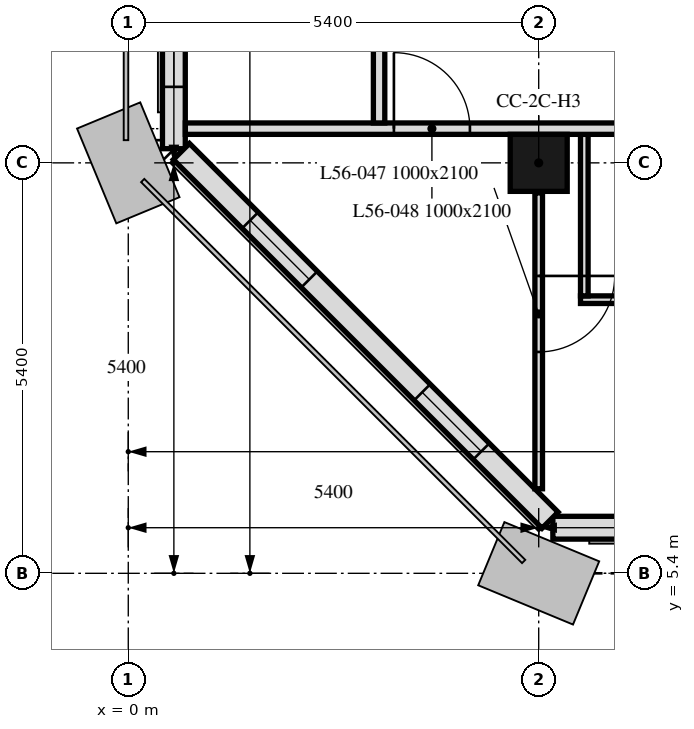
"""IFC4 building model, lengths in metres.
Left out: names, types, materials, properties, quantities, classifications, styles, units other than length and angle.
Written with IfcOpenShell. Run it as: python <this file> out.ifc"""

import sys

from ifc_helpers import new_model, si_unit, direction, frame, frame_2d, origin, origin_2d, place, context, subcontext, project, spatial, rectangle, extrude, element, fill, save


model = new_model("IFC4")
c1 = context("Model", 3, precision=1e-05, world=origin(), true_north=direction((0.0, 1.0)))
c2 = subcontext(c1, "Body", "Model", "MODEL_VIEW")
j1 = project(units=[si_unit("LENGTHUNIT", "METRE"), si_unit("PLANEANGLEUNIT", "RADIAN")], contexts=[c1])
p1 = place(None, origin())
s1 = spatial("IfcSite", under=j1, at=p1, CompositionType="ELEMENT")
p2 = place(p1, origin())
s2 = spatial("IfcBuilding", under=s1, at=p2, CompositionType="ELEMENT")
p3 = place(p2, frame((0.0, 0.0, 223.6)))
s3 = spatial("IfcBuildingStorey", under=s2, at=p3, CompositionType="ELEMENT", Elevation=223.6)
p4 = place(p3, frame((5.4, 10.8, 0.0), z_axis=(0.0, 0.0, 1.0), x_axis=(1.0, 0.0, 0.0)))
e1 = element("IfcColumn", 1, at=p4, inside=s3, PredefinedType="COLUMN", context=c2, shape_type="SweptSolid", body=[
    extrude(rectangle(XDim=0.75, YDim=0.75, at=origin_2d()), origin(), (0.0, 0.0, 1.0), 3.0),
])
p5 = place(p3, frame((5.586, 6.0, 0.0), z_axis=(0.0, 0.0, 1.0), x_axis=(1.0, 0.0, 0.0)))
e2 = element("IfcWall", 2, at=p5, inside=s3, PredefinedType="SOLIDWALL", context=c2, shape_type="SweptSolid", body=[
    extrude(rectangle(XDim=32.027, YDim=0.3, at=frame_2d((16.014, 0.0))), origin(), (0.0, 0.0, 1.0), 3.0),
])
p6 = place(p5, frame((2.764, 0.0, 0.9)))
e3 = element("IfcOpeningElement", 3, at=p6, cuts=e2, PredefinedType="OPENING", context=c2, shape_type="SweptSolid", body=[
    extrude(rectangle(XDim=1.1, YDim=1.7, at=frame_2d((0.55, 0.85))), frame((0.0, 0.16, 0.0), z_axis=(0.0, -1.0, 0.0), x_axis=(1.0, 0.0, 0.0)), (0.0, 0.0, 1.0), 0.32),
])
p7 = place(p5, frame((6.214, 0.0, 0.9)))
e4 = element("IfcOpeningElement", 4, at=p7, cuts=e2, PredefinedType="OPENING", context=c2, shape_type="SweptSolid", body=[
    extrude(rectangle(XDim=3.4, YDim=1.7, at=frame_2d((1.7, 0.85))), frame((0.0, 0.16, 0.0), z_axis=(0.0, -1.0, 0.0), x_axis=(1.0, 0.0, 0.0)), (0.0, 0.0, 1.0), 0.32),
])
p8 = place(p5, frame((13.564, 0.0, 0.9)))
e5 = element("IfcOpeningElement", 5, at=p8, cuts=e2, PredefinedType="OPENING", context=c2, shape_type="SweptSolid", body=[
    extrude(rectangle(XDim=1.1, YDim=1.7, at=frame_2d((0.55, 0.85))), frame((0.0, 0.16, 0.0), z_axis=(0.0, -1.0, 0.0), x_axis=(1.0, 0.0, 0.0)), (0.0, 0.0, 1.0), 0.32),
])
p9 = place(p5, frame((17.014, 0.0, 0.9)))
e6 = element("IfcOpeningElement", 6, at=p9, cuts=e2, PredefinedType="OPENING", context=c2, shape_type="SweptSolid", body=[
    extrude(rectangle(XDim=3.4, YDim=1.7, at=frame_2d((1.7, 0.85))), frame((0.0, 0.16, 0.0), z_axis=(0.0, -1.0, 0.0), x_axis=(1.0, 0.0, 0.0)), (0.0, 0.0, 1.0), 0.32),
])
p10 = place(p5, frame((24.364, 0.0, 0.9)))
e7 = element("IfcOpeningElement", 7, at=p10, cuts=e2, PredefinedType="OPENING", context=c2, shape_type="SweptSolid", body=[
    extrude(rectangle(XDim=1.1, YDim=1.7, at=frame_2d((0.55, 0.85))), frame((0.0, 0.16, 0.0), z_axis=(0.0, -1.0, 0.0), x_axis=(1.0, 0.0, 0.0)), (0.0, 0.0, 1.0), 0.32),
])
p11 = place(p5, frame((27.814, 0.0, 0.9)))
e8 = element("IfcOpeningElement", 8, at=p11, cuts=e2, PredefinedType="OPENING", context=c2, shape_type="SweptSolid", body=[
    extrude(rectangle(XDim=3.4, YDim=1.7, at=frame_2d((1.7, 0.85))), frame((0.0, 0.16, 0.0), z_axis=(0.0, -1.0, 0.0), x_axis=(1.0, 0.0, 0.0)), (0.0, 0.0, 1.0), 0.32),
])
p12 = place(p3, frame((0.6, 43.014, 0.0), z_axis=(0.0, 0.0, 1.0), x_axis=(0.0, -1.0, 0.0)))
e9 = element("IfcWall", 9, at=p12, inside=s3, PredefinedType="SOLIDWALL", context=c2, shape_type="SweptSolid", body=[
    extrude(rectangle(XDim=32.027, YDim=0.3, at=frame_2d((16.014, 0.0))), origin(), (0.0, 0.0, 1.0), 3.0),
])
p13 = place(p12, frame((1.789, 0.0, 0.9)))
e10 = element("IfcOpeningElement", 10, at=p13, cuts=e9, PredefinedType="OPENING", context=c2, shape_type="SweptSolid", body=[
    extrude(rectangle(XDim=0.65, YDim=1.7, at=frame_2d((0.325, 0.85))), frame((0.0, 0.16, 0.0), z_axis=(0.0, -1.0, 0.0), x_axis=(1.0, 0.0, 0.0)), (0.0, 0.0, 1.0), 0.32),
])
p14 = place(p12, frame((2.764, 0.0, 0.9)))
e11 = element("IfcOpeningElement", 11, at=p14, cuts=e9, PredefinedType="OPENING", context=c2, shape_type="SweptSolid", body=[
    extrude(rectangle(XDim=1.1, YDim=1.7, at=frame_2d((0.55, 0.85))), frame((0.0, 0.16, 0.0), z_axis=(0.0, -1.0, 0.0), x_axis=(1.0, 0.0, 0.0)), (0.0, 0.0, 1.0), 0.32),
])
p15 = place(p12, frame((6.214, 0.0, 0.9)))
e12 = element("IfcOpeningElement", 12, at=p15, cuts=e9, PredefinedType="OPENING", context=c2, shape_type="SweptSolid", body=[
    extrude(rectangle(XDim=3.4, YDim=1.7, at=frame_2d((1.7, 0.85))), frame((0.0, 0.16, 0.0), z_axis=(0.0, -1.0, 0.0), x_axis=(1.0, 0.0, 0.0)), (0.0, 0.0, 1.0), 0.32),
])
p16 = place(p12, frame((11.964, 0.0, 0.9)))
e13 = element("IfcOpeningElement", 13, at=p16, cuts=e9, PredefinedType="OPENING", context=c2, shape_type="SweptSolid", body=[
    extrude(rectangle(XDim=1.1, YDim=1.7, at=frame_2d((0.55, 0.85))), frame((0.0, 0.16, 0.0), z_axis=(0.0, -1.0, 0.0), x_axis=(1.0, 0.0, 0.0)), (0.0, 0.0, 1.0), 0.32),
])
p17 = place(p12, frame((13.564, 0.0, 0.9)))
e14 = element("IfcOpeningElement", 14, at=p17, cuts=e9, PredefinedType="OPENING", context=c2, shape_type="SweptSolid", body=[
    extrude(rectangle(XDim=1.1, YDim=1.7, at=frame_2d((0.55, 0.85))), frame((0.0, 0.16, 0.0), z_axis=(0.0, -1.0, 0.0), x_axis=(1.0, 0.0, 0.0)), (0.0, 0.0, 1.0), 0.32),
])
p18 = place(p12, frame((17.364, 0.0, 0.9)))
e15 = element("IfcOpeningElement", 15, at=p18, cuts=e9, PredefinedType="OPENING", context=c2, shape_type="SweptSolid", body=[
    extrude(rectangle(XDim=1.1, YDim=1.7, at=frame_2d((0.55, 0.85))), frame((0.0, 0.16, 0.0), z_axis=(0.0, -1.0, 0.0), x_axis=(1.0, 0.0, 0.0)), (0.0, 0.0, 1.0), 0.32),
])
p19 = place(p12, frame((18.964, 0.0, 0.9)))
e16 = element("IfcOpeningElement", 16, at=p19, cuts=e9, PredefinedType="OPENING", context=c2, shape_type="SweptSolid", body=[
    extrude(rectangle(XDim=1.1, YDim=1.7, at=frame_2d((0.55, 0.85))), frame((0.0, 0.16, 0.0), z_axis=(0.0, -1.0, 0.0), x_axis=(1.0, 0.0, 0.0)), (0.0, 0.0, 1.0), 0.32),
])
p20 = place(p12, frame((22.764, 0.0, 0.9)))
e17 = element("IfcOpeningElement", 17, at=p20, cuts=e9, PredefinedType="OPENING", context=c2, shape_type="SweptSolid", body=[
    extrude(rectangle(XDim=1.1, YDim=1.7, at=frame_2d((0.55, 0.85))), frame((0.0, 0.16, 0.0), z_axis=(0.0, -1.0, 0.0), x_axis=(1.0, 0.0, 0.0)), (0.0, 0.0, 1.0), 0.32),
])
p21 = place(p12, frame((24.364, 0.0, 0.9)))
e18 = element("IfcOpeningElement", 18, at=p21, cuts=e9, PredefinedType="OPENING", context=c2, shape_type="SweptSolid", body=[
    extrude(rectangle(XDim=1.1, YDim=1.7, at=frame_2d((0.55, 0.85))), frame((0.0, 0.16, 0.0), z_axis=(0.0, -1.0, 0.0), x_axis=(1.0, 0.0, 0.0)), (0.0, 0.0, 1.0), 0.32),
])
p22 = place(p12, frame((27.814, 0.0, 0.9)))
e19 = element("IfcOpeningElement", 19, at=p22, cuts=e9, PredefinedType="OPENING", context=c2, shape_type="SweptSolid", body=[
    extrude(rectangle(XDim=3.4, YDim=1.7, at=frame_2d((1.7, 0.85))), frame((0.0, 0.16, 0.0), z_axis=(0.0, -1.0, 0.0), x_axis=(1.0, 0.0, 0.0)), (0.0, 0.0, 1.0), 0.32),
])
p23 = place(p3, frame((0.699, 10.949, 0.0), z_axis=(0.0, 0.0, 1.0), x_axis=(0.707106781187, -0.707106781187, 0.0)))
e20 = element("IfcWall", 20, at=p23, inside=s3, PredefinedType="SOLIDWALL", context=c2, shape_type="SweptSolid", body=[
    extrude(rectangle(XDim=6.86, YDim=0.3, at=frame_2d((3.43, 0.0))), origin(), (0.0, 0.0, 1.0), 3.0),
])
p24 = place(p23, frame((1.28, 0.0, 0.9)))
e21 = element("IfcOpeningElement", 21, at=p24, cuts=e20, PredefinedType="OPENING", context=c2, shape_type="SweptSolid", body=[
    extrude(rectangle(XDim=1.1, YDim=1.7, at=frame_2d((0.55, 0.85))), frame((0.0, 0.16, 0.0), z_axis=(0.0, -1.0, 0.0), x_axis=(1.0, 0.0, 0.0)), (0.0, 0.0, 1.0), 0.32),
])
p25 = place(p23, frame((4.48, 0.0, 0.9)))
e22 = element("IfcOpeningElement", 22, at=p25, cuts=e20, PredefinedType="OPENING", context=c2, shape_type="SweptSolid", body=[
    extrude(rectangle(XDim=1.1, YDim=1.7, at=frame_2d((0.55, 0.85))), frame((0.0, 0.16, 0.0), z_axis=(0.0, -1.0, 0.0), x_axis=(1.0, 0.0, 0.0)), (0.0, 0.0, 1.0), 0.32),
])
p26 = place(p3, frame((8.35, 9.0, 0.0), z_axis=(0.0, 0.0, 1.0), x_axis=(-1.0, 0.0, 0.0)))
e23 = element("IfcWall", 23, at=p26, inside=s3, PredefinedType="PARTITIONING", context=c2, shape_type="SweptSolid", body=[
    extrude(rectangle(XDim=2.4, YDim=0.1, at=frame_2d((1.2, 0.0))), origin(), (0.0, 0.0, 1.0), 3.0),
])
p27 = place(p26, frame((0.25, 0.0, 0.0)))
e24 = element("IfcOpeningElement", 24, at=p27, cuts=e23, PredefinedType="OPENING", context=c2, shape_type="SweptSolid", body=[
    extrude(rectangle(XDim=0.9, YDim=2.1, at=frame_2d((0.45, 1.05))), frame((0.0, 0.05, 0.0), z_axis=(0.0, -1.0, 0.0), x_axis=(1.0, 0.0, 0.0)), (0.0, 0.0, 1.0), 0.1),
])
p28 = place(p3, frame((6.0, 9.05, 0.0), z_axis=(0.0, 0.0, 1.0), x_axis=(0.0, 1.0, 0.0)))
e25 = element("IfcWall", 25, at=p28, inside=s3, PredefinedType="PARTITIONING", context=c2, shape_type="SweptSolid", body=[
    extrude(rectangle(XDim=2.125, YDim=0.1, at=frame_2d((1.062, 0.0))), origin(), (0.0, 0.0, 1.0), 3.0),
])
p29 = place(p3, frame((5.4, 10.405, 0.0), z_axis=(0.0, 0.0, 1.0), x_axis=(0.0, -1.0, 0.0)))
e26 = element("IfcWall", 26, at=p29, inside=s3, PredefinedType="PARTITIONING", context=c2, shape_type="SweptSolid", body=[
    extrude(rectangle(XDim=3.893, YDim=0.1, at=frame_2d((1.946, 0.0))), origin(), (0.0, 0.0, 1.0), 3.0),
])
p30 = place(p29, frame((1.093, 0.0, 0.0)))
e27 = element("IfcOpeningElement", 27, at=p30, cuts=e26, PredefinedType="OPENING", context=c2, shape_type="SweptSolid", body=[
    extrude(rectangle(XDim=1.0, YDim=2.1, at=frame_2d((0.5, 1.05))), frame((0.0, 0.05, 0.0), z_axis=(0.0, -1.0, 0.0), x_axis=(1.0, 0.0, 0.0)), (0.0, 0.0, 1.0), 0.1),
])
p31 = place(p3, frame((0.751, 11.25, 0.0), z_axis=(0.0, 0.0, 1.0), x_axis=(1.0, 0.0, 0.0)))
e28 = element("IfcWall", 28, at=p31, inside=s3, PredefinedType="PARTITIONING", context=c2, shape_type="SweptSolid", body=[
    extrude(rectangle(XDim=41.698, YDim=0.15, at=frame_2d((20.849, 0.0))), origin(), (0.0, 0.0, 1.0), 3.0),
])
p32 = place(p31, frame((39.249, 0.0, 0.0)))
e29 = element("IfcOpeningElement", 29, at=p32, cuts=e28, PredefinedType="OPENING", context=c2, shape_type="SweptSolid", body=[
    extrude(rectangle(XDim=1.0, YDim=2.1, at=frame_2d((0.5, 1.05))), frame((0.0, 0.075, 0.0), z_axis=(0.0, -1.0, 0.0), x_axis=(1.0, 0.0, 0.0)), (0.0, 0.0, 1.0), 0.15),
])
p33 = place(p31, frame((27.649, 0.0, 0.0)))
e30 = element("IfcOpeningElement", 30, at=p33, cuts=e28, PredefinedType="OPENING", context=c2, shape_type="SweptSolid", body=[
    extrude(rectangle(XDim=1.0, YDim=2.1, at=frame_2d((0.5, 1.05))), frame((0.0, 0.075, 0.0), z_axis=(0.0, -1.0, 0.0), x_axis=(1.0, 0.0, 0.0)), (0.0, 0.0, 1.0), 0.15),
])
p34 = place(p31, frame((23.049, 0.0, 0.0)))
e31 = element("IfcOpeningElement", 31, at=p34, cuts=e28, PredefinedType="OPENING", context=c2, shape_type="SweptSolid", body=[
    extrude(rectangle(XDim=1.0, YDim=2.1, at=frame_2d((0.5, 1.05))), frame((0.0, 0.075, 0.0), z_axis=(0.0, -1.0, 0.0), x_axis=(1.0, 0.0, 0.0)), (0.0, 0.0, 1.0), 0.15),
])
p35 = place(p31, frame((11.449, 0.0, 0.0)))
e32 = element("IfcOpeningElement", 32, at=p35, cuts=e28, PredefinedType="OPENING", context=c2, shape_type="SweptSolid", body=[
    extrude(rectangle(XDim=1.0, YDim=2.1, at=frame_2d((0.5, 1.05))), frame((0.0, 0.075, 0.0), z_axis=(0.0, -1.0, 0.0), x_axis=(1.0, 0.0, 0.0)), (0.0, 0.0, 1.0), 0.15),
])
p36 = place(p31, frame((2.744, 0.0, 0.0)))
e33 = element("IfcOpeningElement", 33, at=p36, cuts=e28, PredefinedType="OPENING", context=c2, shape_type="SweptSolid", body=[
    extrude(rectangle(XDim=1.0, YDim=2.1, at=frame_2d((0.5, 1.05))), frame((0.0, 0.075, 0.0), z_axis=(0.0, -1.0, 0.0), x_axis=(1.0, 0.0, 0.0)), (0.0, 0.0, 1.0), 0.15),
])
p37 = place(p3, frame((3.3, 11.325, 0.0), z_axis=(0.0, 0.0, 1.0), x_axis=(0.0, 1.0, 0.0)))
e34 = element("IfcWall", 34, at=p37, inside=s3, PredefinedType="PARTITIONING", context=c2, shape_type="SweptSolid", body=[
    extrude(rectangle(XDim=30.0, YDim=0.15, at=frame_2d((15.0, 0.0))), origin(), (0.0, 0.0, 1.0), 2.4),
])
p38 = place(p37, frame((17.875, 0.0, 0.0)))
e35 = element("IfcOpeningElement", 35, at=p38, cuts=e34, PredefinedType="OPENING", context=c2, shape_type="SweptSolid", body=[
    extrude(rectangle(XDim=1.0, YDim=2.1, at=frame_2d((0.5, 1.05))), frame((0.0, 0.075, 0.0), z_axis=(0.0, -1.0, 0.0), x_axis=(1.0, 0.0, 0.0)), (0.0, 0.0, 1.0), 0.15),
])
p39 = place(p37, frame((1.9, 0.0, 0.0)))
e36 = element("IfcOpeningElement", 36, at=p39, cuts=e34, PredefinedType="OPENING", context=c2, shape_type="SweptSolid", body=[
    extrude(rectangle(XDim=1.0, YDim=2.1, at=frame_2d((0.5, 1.05))), frame((0.0, 0.075, 0.0), z_axis=(0.0, -1.0, 0.0), x_axis=(1.0, 0.0, 0.0)), (0.0, 0.0, 1.0), 0.15),
])
p40 = place(p37, frame((23.725, 0.0, 0.0)))
e37 = element("IfcOpeningElement", 37, at=p40, cuts=e34, PredefinedType="OPENING", context=c2, shape_type="SweptSolid", body=[
    extrude(rectangle(XDim=1.0, YDim=2.1, at=frame_2d((0.5, 1.05))), frame((0.0, 0.075, 0.0), z_axis=(0.0, -1.0, 0.0), x_axis=(1.0, 0.0, 0.0)), (0.0, 0.0, 1.0), 0.15),
])
p41 = place(p37, frame((8.425, 0.0, 0.0)))
e38 = element("IfcOpeningElement", 38, at=p41, cuts=e34, PredefinedType="OPENING", context=c2, shape_type="SweptSolid", body=[
    extrude(rectangle(XDim=1.0, YDim=2.1, at=frame_2d((0.5, 1.05))), frame((0.0, 0.075, 0.0), z_axis=(0.0, -1.0, 0.0), x_axis=(1.0, 0.0, 0.0)), (0.0, 0.0, 1.0), 0.15),
])
p42 = place(p22, origin())
e39 = element("IfcWindow", 39, at=p42, inside=s3, PartitioningType="SINGLE_PANEL", PredefinedType="WINDOW", context=c2, shape_type="SweptSolid", body=[
    extrude(rectangle(XDim=3.4, YDim=1.7, at=frame_2d((1.7, 0.85))), frame((0.0, 0.03, 0.0), z_axis=(0.0, -1.0, 0.0), x_axis=(1.0, 0.0, 0.0)), (0.0, 0.0, 1.0), 0.06),
])
fill(e19, e39)
p43 = place(p24, origin())
e40 = element("IfcWindow", 40, at=p43, inside=s3, PartitioningType="SINGLE_PANEL", PredefinedType="WINDOW", context=c2, shape_type="SweptSolid", body=[
    extrude(rectangle(XDim=1.1, YDim=1.7, at=frame_2d((0.55, 0.85))), frame((0.0, 0.03, 0.0), z_axis=(0.0, -1.0, 0.0), x_axis=(1.0, 0.0, 0.0)), (0.0, 0.0, 1.0), 0.06),
])
fill(e21, e40)
p44 = place(p25, origin())
e41 = element("IfcWindow", 41, at=p44, inside=s3, PartitioningType="SINGLE_PANEL", PredefinedType="WINDOW", context=c2, shape_type="SweptSolid", body=[
    extrude(rectangle(XDim=1.1, YDim=1.7, at=frame_2d((0.55, 0.85))), frame((0.0, 0.03, 0.0), z_axis=(0.0, -1.0, 0.0), x_axis=(1.0, 0.0, 0.0)), (0.0, 0.0, 1.0), 0.06),
])
fill(e22, e41)
p45 = place(p30, origin())
e42 = element("IfcDoor", 42, at=p45, inside=s3, OperationType="SINGLE_SWING_RIGHT", PredefinedType="DOOR", context=c2, shape_type="SweptSolid", body=[
    extrude(rectangle(XDim=1.0, YDim=2.1, at=frame_2d((0.5, 1.05))), frame((0.0, 0.025, 0.0), z_axis=(0.0, -1.0, 0.0), x_axis=(1.0, 0.0, 0.0)), (0.0, 0.0, 1.0), 0.05),
])
fill(e27, e42)
p46 = place(p36, origin())
e43 = element("IfcDoor", 43, at=p46, inside=s3, OperationType="SINGLE_SWING_LEFT", PredefinedType="DOOR", context=c2, shape_type="SweptSolid", body=[
    extrude(rectangle(XDim=1.0, YDim=2.1, at=frame_2d((0.5, 1.05))), frame((0.0, 0.025, 0.0), z_axis=(0.0, -1.0, 0.0), x_axis=(1.0, 0.0, 0.0)), (0.0, 0.0, 1.0), 0.05),
])
fill(e33, e43)
save(model, sys.argv[1])
